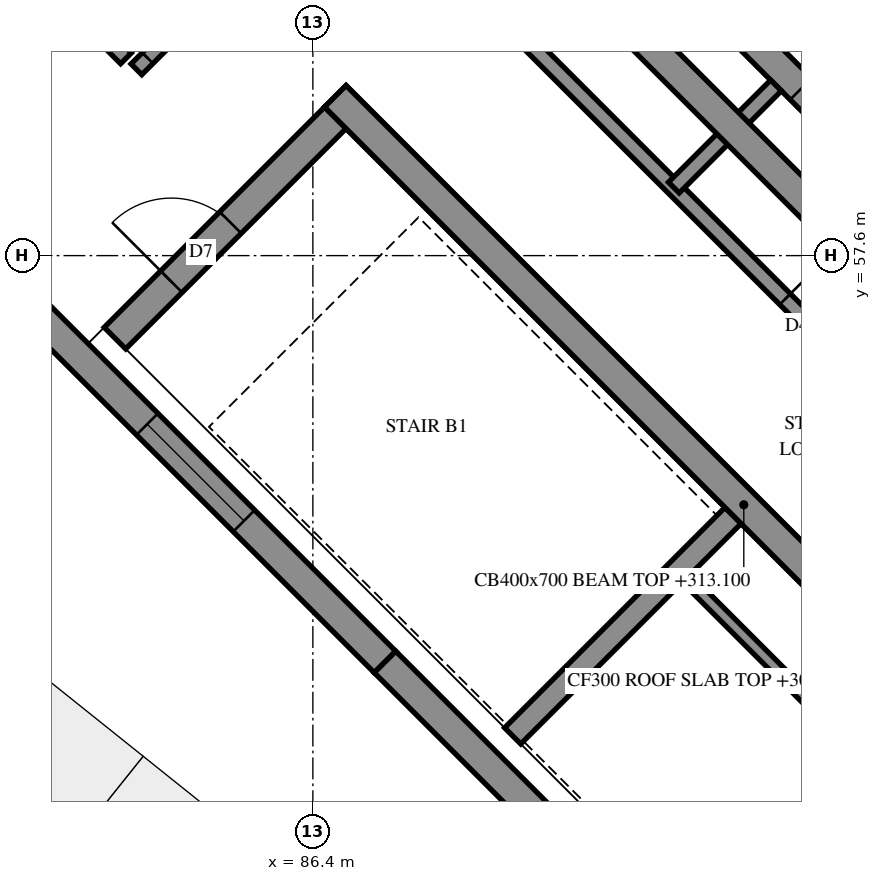
"""IFC4 building model, lengths in metres.
Left out: names, types, materials, properties, quantities, classifications, styles, units other than length and angle.
Written with IfcOpenShell. Run it as: python <this file> out.ifc"""

import sys

from ifc_helpers import new_model, si_unit, direction, frame, frame_2d, origin, place, context, subcontext, project, spatial, polyline, rectangle, outline, extrude, element, fill, save


model = new_model("IFC4")
c1 = context("Model", 3, precision=1e-05, world=origin(), true_north=direction((0.0, 1.0)))
c2 = subcontext(c1, "Body", "Model", "MODEL_VIEW")
j1 = project(units=[si_unit("LENGTHUNIT", "METRE"), si_unit("PLANEANGLEUNIT", "RADIAN")], contexts=[c1])
p1 = place(None, origin())
s1 = spatial("IfcSite", under=j1, at=p1, CompositionType="ELEMENT")
p2 = place(p1, origin())
s2 = spatial("IfcBuilding", under=s1, at=p2, CompositionType="ELEMENT")
p3 = place(p2, frame((0.0, 0.0, 309.6)))
s3 = spatial("IfcBuildingStorey", under=s2, at=p3, CompositionType="ELEMENT", Elevation=309.6)
p4 = place(p3, frame((86.695, 59.696, -0.3), z_axis=(0.0, 0.0, 1.0), x_axis=(0.7071100706, -0.7071034917, 0.0)))
e1 = element("IfcWall", 1, at=p4, inside=s3, PredefinedType="SHEAR", context=c2, shape_type="SweptSolid", body=[
    extrude(outline(polyline([(0.0, 0.0), (15.2, 0.0), (15.2, 3.1), (0.0, 3.1), (0.0, 0.0)])), frame((0.0, 0.2, 0.0), z_axis=(0.0, -1.0, 0.0), x_axis=(1.0, 0.0, 0.0)), (0.0, 0.0, 1.0), 0.4),
])
p5 = place(p4, frame((10.4, 0.0, 0.3)))
e2 = element("IfcOpeningElement", 2, at=p5, cuts=e1, PredefinedType="OPENING", context=c2, shape_type="SweptSolid", body=[
    extrude(rectangle(XDim=0.8, YDim=2.1, at=frame_2d((0.4, 1.05))), frame((0.0, 0.21, 0.0), z_axis=(0.0, -1.0, 0.0), x_axis=(1.0, 0.0, 0.0)), (0.0, 0.0, 1.0), 0.42),
])
p6 = place(p3, frame((83.796, 56.514, -0.3), z_axis=(0.0, 0.0, 1.0), x_axis=(0.7071067812, 0.7071067812, 0.0)))
e3 = element("IfcWall", 3, at=p6, inside=s3, PredefinedType="SHEAR", context=c2, shape_type="SweptSolid", body=[
    extrude(outline(polyline([(0.0, 0.0), (4.1, 0.0), (4.1, 3.1), (0.0, 3.1), (0.0, 0.0)])), frame((0.0, 0.2, 0.0), z_axis=(0.0, -1.0, 0.0), x_axis=(1.0, 0.0, 0.0)), (0.0, 0.0, 1.0), 0.4),
])
p7 = place(p6, frame((1.05, 0.0, 0.3)))
e4 = element("IfcOpeningElement", 4, at=p7, cuts=e3, PredefinedType="OPENING", context=c2, shape_type="SweptSolid", body=[
    extrude(rectangle(XDim=1.1, YDim=2.1, at=frame_2d((0.55, 1.05))), frame((0.0, 0.21, 0.0), z_axis=(0.0, -1.0, 0.0), x_axis=(1.0, 0.0, 0.0)), (0.0, 0.0, 1.0), 0.42),
])
p8 = place(p3, frame((89.029, 51.282, 0.0), z_axis=(0.0, 0.0, 1.0), x_axis=(0.7071067812, 0.7071067812, 0.0)))
e5 = element("IfcWall", 5, at=p8, inside=s3, PredefinedType="SOLIDWALL", context=c2, shape_type="SweptSolid", body=[
    extrude(outline(polyline([(0.0, 0.0), (4.1, 0.0), (4.1, 3.5), (0.0, 3.5), (0.0, 0.0)])), frame((0.0, 0.15, 0.0), z_axis=(0.0, -1.0, 0.0), x_axis=(1.0, 0.0, 0.0)), (0.0, 0.0, 1.0), 0.3),
])
p9 = place(p3, frame((94.42, 58.194, 0.0), z_axis=(0.0, 0.0, 1.0), x_axis=(-0.7071067812, 0.7071067812, 0.0)))
e6 = element("IfcWall", 6, at=p9, inside=s3, PredefinedType="SOLIDWALL", context=c2, shape_type="SweptSolid", body=[
    extrude(outline(polyline([(0.0, -0.2), (7.917, -0.2), (7.917, 0.2), (0.0, 0.2), (0.0, -0.2)])), origin(), (0.0, 0.0, 1.0), 3.5),
])
p10 = place(p9, frame((0.462, 0.0, 0.7)))
e7 = element("IfcOpeningElement", 7, at=p10, cuts=e6, PredefinedType="OPENING", context=c2, shape_type="SweptSolid", body=[
    extrude(rectangle(XDim=1.8, YDim=2.2, at=frame_2d((0.9, 1.1))), frame((0.0, 0.21, 0.0), z_axis=(0.0, -1.0, 0.0), x_axis=(1.0, 0.0, 0.0)), (0.0, 0.0, 1.0), 0.42),
])
p11 = place(p9, frame((3.425, 0.0, 0.7)))
e8 = element("IfcOpeningElement", 8, at=p11, cuts=e6, PredefinedType="OPENING", context=c2, shape_type="SweptSolid", body=[
    extrude(rectangle(XDim=1.8, YDim=2.2, at=frame_2d((0.9, 1.1))), frame((0.0, 0.21, 0.0), z_axis=(0.0, -1.0, 0.0), x_axis=(1.0, 0.0, 0.0)), (0.0, 0.0, 1.0), 0.42),
])
p12 = place(p3, frame((82.406, 57.197, 0.0), z_axis=(0.0, 0.0, 1.0), x_axis=(0.7071067812, -0.7071067812, 0.0)))
e9 = element("IfcWall", 9, at=p12, inside=s3, PredefinedType="SOLIDWALL", context=c2, shape_type="SweptSolid", body=[
    extrude(outline(polyline([(0.0, -0.2), (6.99, -0.2), (6.99, 0.2), (0.0, 0.2), (0.0, -0.2)])), origin(), (0.0, 0.0, 1.0), 3.5),
])
p13 = place(p12, frame((2.565, 0.0, 0.7)))
e10 = element("IfcOpeningElement", 10, at=p13, cuts=e9, PredefinedType="OPENING", context=c2, shape_type="SweptSolid", body=[
    extrude(rectangle(XDim=1.8, YDim=2.2, at=frame_2d((0.9, 1.1))), frame((0.0, 0.21, 0.0), z_axis=(0.0, -1.0, 0.0), x_axis=(1.0, 0.0, 0.0)), (0.0, 0.0, 1.0), 0.42),
])
p14 = place(p3, frame((87.349, 52.254, 0.0), z_axis=(0.0, 0.0, 1.0), x_axis=(0.7071139341, -0.7070996282, 0.0)))
e11 = element("IfcWall", 11, at=p14, inside=s3, PredefinedType="SOLIDWALL", context=c2, shape_type="SweptSolid", body=[
    extrude(outline(polyline([(0.0, -0.2), (6.99, -0.2), (6.99, 0.2), (0.0, 0.2), (0.0, -0.2)])), origin(), (0.0, 0.0, 1.0), 3.5),
])
p15 = place(p14, frame((2.775, 0.0, 0.7)))
e12 = element("IfcOpeningElement", 12, at=p15, cuts=e11, PredefinedType="OPENING", context=c2, shape_type="SweptSolid", body=[
    extrude(rectangle(XDim=1.8, YDim=2.2, at=frame_2d((0.9, 1.1))), frame((0.0, 0.21, 0.0), z_axis=(0.0, -1.0, 0.0), x_axis=(1.0, 0.0, 0.0)), (0.0, 0.0, 1.0), 0.42),
])
p16 = place(p3, frame((91.313, 53.354, 0.0), z_axis=(0.0, 0.0, 1.0), x_axis=(0.7071140275, -0.7070995348, 0.0)))
e13 = element("IfcWall", 13, at=p16, inside=s3, PredefinedType="PARTITIONING", context=c2, shape_type="SweptSolid", body=[
    extrude(outline(polyline([(0.0, 0.0), (6.9, 0.0), (6.9, 3.5), (0.0, 3.5), (0.0, 0.0)])), frame((0.0, 0.075, 0.0), z_axis=(0.0, -1.0, 0.0), x_axis=(1.0, 0.0, 0.0)), (0.0, 0.0, 1.0), 0.15),
])
p17 = place(p3, frame((86.835, 62.803, 0.0), z_axis=(0.0, 0.0, 1.0), x_axis=(0.7072045346, -0.7070090143, 0.0)))
e14 = element("IfcWall", 14, at=p17, inside=s3, PredefinedType="PARTITIONING", context=c2, shape_type="SweptSolid", body=[
    extrude(rectangle(XDim=13.298, YDim=0.2, at=frame_2d((6.649, 0.0))), origin(), (0.0, 0.0, 1.0), 3.5),
])
p18 = place(p17, frame((8.169, 0.0, 0.0)))
e15 = element("IfcOpeningElement", 15, at=p18, cuts=e14, PredefinedType="OPENING", context=c2, shape_type="SweptSolid", body=[
    extrude(rectangle(XDim=1.0, YDim=2.1, at=frame_2d((0.5, 1.05))), frame((0.0, 0.11, 0.0), z_axis=(0.0, -1.0, 0.0), x_axis=(1.0, 0.0, 0.0)), (0.0, 0.0, 1.0), 0.22),
])
p19 = place(p3, frame((84.079, 60.051, 0.0), z_axis=(0.0, 0.0, 1.0), x_axis=(0.7071067812, 0.7071067812, 0.0)))
e16 = element("IfcWall", 16, at=p19, inside=s3, PredefinedType="PARTITIONING", context=c2, shape_type="SweptSolid", body=[
    extrude(rectangle(XDim=3.898, YDim=0.2, at=frame_2d((1.949, 0.0))), origin(), (0.0, 0.0, 1.0), 3.5),
])
p20 = place(p19, frame((0.209, 0.0, 0.0)))
e17 = element("IfcOpeningElement", 17, at=p20, cuts=e16, PredefinedType="OPENING", context=c2, shape_type="SweptSolid", body=[
    extrude(rectangle(XDim=1.0, YDim=2.1, at=frame_2d((0.5, 1.05))), frame((0.0, 0.11, 0.0), z_axis=(0.0, -1.0, 0.0), x_axis=(1.0, 0.0, 0.0)), (0.0, 0.0, 1.0), 0.22),
])
p21 = place(p3, frame((83.305, 60.831, 0.0), z_axis=(0.0, 0.0, 1.0), x_axis=(0.7071067812, -0.7071067812, 0.0)))
e18 = element("IfcWall", 18, at=p21, inside=s3, PredefinedType="PARTITIONING", context=c2, shape_type="SweptSolid", body=[
    extrude(rectangle(XDim=0.899, YDim=0.2, at=frame_2d((0.45, 0.0))), origin(), (0.0, 0.0, 1.0), 3.5),
])
p22 = place(p3, frame((91.149, 58.495, 0.0), z_axis=(0.0, 0.0, 1.0), x_axis=(0.7071067812, 0.7071067812, 0.0)))
e19 = element("IfcWall", 19, at=p22, inside=s3, PredefinedType="PARTITIONING", context=c2, shape_type="SweptSolid", body=[
    extrude(outline(polyline([(0.0, -0.1), (1.9, -0.1), (1.9, 0.1), (0.0, 0.1), (0.0, -0.1)])), origin(), (0.0, 0.0, 1.0), 3.5),
])
p23 = place(p10, origin())
e20 = element("IfcWindow", 20, at=p23, inside=s3, PartitioningType="SINGLE_PANEL", PredefinedType="WINDOW", context=c2, shape_type="SweptSolid", body=[
    extrude(rectangle(XDim=1.8, YDim=2.2, at=frame_2d((0.9, 1.1))), frame((0.0, 0.08, 0.0), z_axis=(0.0, -1.0, 0.0), x_axis=(1.0, 0.0, 0.0)), (0.0, 0.0, 1.0), 0.06),
])
fill(e7, e20)
p24 = place(p13, origin())
e21 = element("IfcWindow", 21, at=p24, inside=s3, PartitioningType="SINGLE_PANEL", PredefinedType="WINDOW", context=c2, shape_type="SweptSolid", body=[
    extrude(rectangle(XDim=1.8, YDim=2.2, at=frame_2d((0.9, 1.1))), frame((0.0, 0.08, 0.0), z_axis=(0.0, -1.0, 0.0), x_axis=(1.0, 0.0, 0.0)), (0.0, 0.0, 1.0), 0.06),
])
fill(e10, e21)
p25 = place(p7, origin())
e22 = element("IfcDoor", 22, at=p25, inside=s3, OperationType="SINGLE_SWING_LEFT", PredefinedType="DOOR", context=c2, shape_type="SweptSolid", body=[
    extrude(rectangle(XDim=1.1, YDim=2.1, at=frame_2d((0.55, 1.05))), frame((0.0, 0.025, 0.0), z_axis=(0.0, -1.0, 0.0), x_axis=(1.0, 0.0, 0.0)), (0.0, 0.0, 1.0), 0.05),
])
fill(e4, e22)
p26 = place(p20, origin())
e23 = element("IfcDoor", 23, at=p26, inside=s3, OperationType="SINGLE_SWING_RIGHT", PredefinedType="DOOR", context=c2, shape_type="SweptSolid", body=[
    extrude(rectangle(XDim=1.0, YDim=2.1, at=frame_2d((0.5, 1.05))), frame((0.0, 0.025, 0.0), z_axis=(0.0, -1.0, 0.0), x_axis=(1.0, 0.0, 0.0)), (0.0, 0.0, 1.0), 0.05),
])
fill(e17, e23)
p27 = place(p18, origin())
e24 = element("IfcDoor", 24, at=p27, inside=s3, OperationType="SINGLE_SWING_RIGHT", PredefinedType="DOOR", context=c2, shape_type="SweptSolid", body=[
    extrude(rectangle(XDim=1.0, YDim=2.1, at=frame_2d((0.5, 1.05))), frame((0.0, 0.025, 0.0), z_axis=(0.0, -1.0, 0.0), x_axis=(1.0, 0.0, 0.0)), (0.0, 0.0, 1.0), 0.05),
])
fill(e15, e24)
save(model, sys.argv[1])
